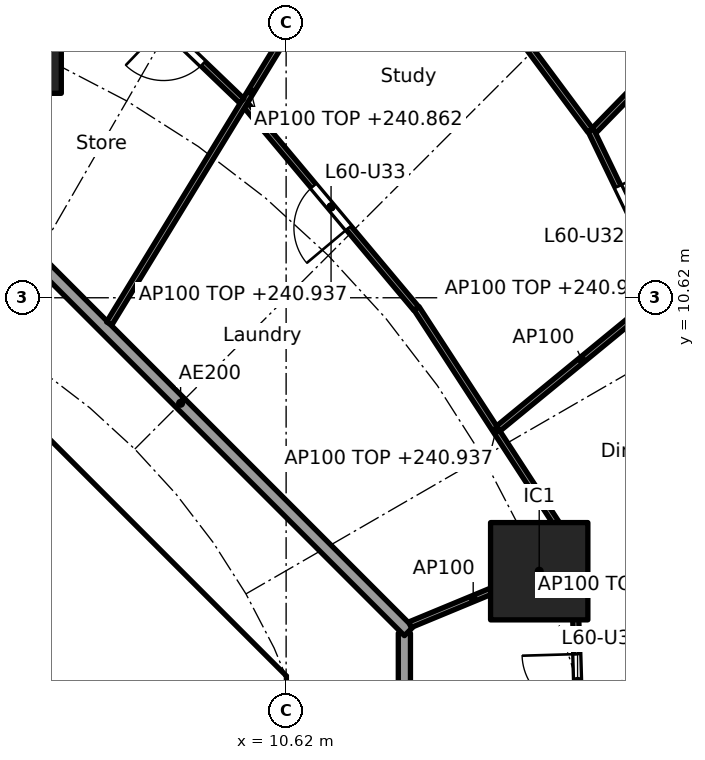
"""IFC4 building model, lengths in metres.
Left out: names, types, materials, properties, quantities, classifications, styles, units other than length and angle.
Written with IfcOpenShell. Run it as: python <this file> out.ifc"""

import sys

from ifc_helpers import new_model, si_unit, direction, frame, frame_2d, origin, origin_2d, place, context, subcontext, project, spatial, polyline, rectangle, outline, extrude, element, fill, save


model = new_model("IFC4")
c1 = context("Model", 3, precision=1e-05, world=origin(), true_north=direction((0.0, 1.0)))
c2 = subcontext(c1, "Body", "Model", "MODEL_VIEW")
j1 = project(units=[si_unit("LENGTHUNIT", "METRE"), si_unit("PLANEANGLEUNIT", "RADIAN")], contexts=[c1])
p1 = place(None, origin())
s1 = spatial("IfcSite", under=j1, at=p1, CompositionType="ELEMENT")
p2 = place(p1, origin())
s2 = spatial("IfcBuilding", under=s1, at=p2, CompositionType="ELEMENT")
p3 = place(p2, frame((0.0, 0.0, 238.1)))
s3 = spatial("IfcBuildingStorey", under=s2, at=p3, CompositionType="ELEMENT", Elevation=238.1)
for number, where, z_axis, x_axis in (
    (1, (14.782, 6.123, 0.0), (0.0, 0.0, 1.0), (1.0, 0.0, 0.0)),
    (2, (6.123, 14.782, 0.0), (0.0, 0.0, 1.0), (1.0, 0.0, 0.0)),
):
    element("IfcColumn", number, at=place(p3, frame(where, z_axis=z_axis, x_axis=x_axis)), inside=s3, PredefinedType="COLUMN", context=c2, shape_type="SweptSolid", body=[
        extrude(rectangle(XDim=1.6, YDim=1.6, at=origin_2d()), origin(), (0.0, 0.0, 1.0), 3.7),
    ])
p4 = place(p3, frame((9.988, 4.613, 0.0), z_axis=(0.0, 0.0, 1.0), x_axis=(-0.707106781187, 0.707106781187, 0.0)))
e3 = element("IfcWall", 3, at=p4, inside=s3, PredefinedType="SHEAR", context=c2, shape_type="SweptSolid", body=[
    extrude(rectangle(XDim=7.602, YDim=0.6, at=frame_2d((3.801, 0.0))), origin(), (0.0, 0.0, 1.0), 3.44),
])
p5 = place(p4, frame((3.201, 0.0, 0.0)))
e4 = element("IfcOpeningElement", 4, at=p5, cuts=e3, PredefinedType="OPENING", context=c2, shape_type="SweptSolid", body=[
    extrude(rectangle(XDim=1.2, YDim=2.1, at=frame_2d((0.6, 1.05))), frame((0.0, 0.31, 0.0), z_axis=(0.0, -1.0, 0.0), x_axis=(1.0, 0.0, 0.0)), (0.0, 0.0, 1.0), 0.62),
])
p6 = place(p3, origin())
e5 = element("IfcWall", 5, at=p6, inside=s3, PredefinedType="SHEAR", context=c2, shape_type="SweptSolid", body=[
    extrude(outline(polyline([(9.776, -4.401), (10.025, -4.152), (10.025, -3.801), (10.025, 4.152), (9.776, 4.401), (10.2, 4.825), (10.625, 4.401), (10.625, -4.401), (10.2, -4.825), (9.776, -4.401)])), origin(), (0.0, 0.0, 1.0), 3.44),
])
p7 = place(p3, frame((12.565, -5.104, 0.0), z_axis=(0.0, 0.0, 1.0), x_axis=(0.0, 1.0, 0.0)))
e6 = element("IfcWall", 6, at=p7, inside=s3, PredefinedType="PARTITIONING", context=c2, shape_type="SweptSolid", body=[
    extrude(rectangle(XDim=10.209, YDim=0.2, at=frame_2d((5.104, 0.0))), origin(), (0.0, 0.0, 1.0), 3.44),
])
p8 = place(p3, frame((12.635, 5.134, 0.0), z_axis=(0.0, 0.0, 1.0), x_axis=(-0.707106781187, 0.707106781187, 0.0)))
e7 = element("IfcWall", 7, at=p8, inside=s3, PredefinedType="PARTITIONING", context=c2, shape_type="SweptSolid", body=[
    extrude(rectangle(XDim=10.609, YDim=0.2, at=frame_2d((5.305, 0.0))), origin(), (0.0, 0.0, 1.0), 3.44),
])
p9 = place(p3, frame((15.475, 2.2, 0.0), z_axis=(0.0, 0.0, 1.0), x_axis=(-0.029254637498, 0.999571991497, 0.0)))
e8 = element("IfcWall", 8, at=p9, inside=s3, PredefinedType="PARTITIONING", context=c2, shape_type="SweptSolid", body=[
    extrude(rectangle(XDim=4.223, YDim=0.1, at=frame_2d((2.111, 0.0))), origin(), (0.0, 0.0, 1.0), 2.837),
])
p10 = place(p9, frame((1.661, 0.0, 0.0)))
e9 = element("IfcOpeningElement", 9, at=p10, cuts=e8, PredefinedType="OPENING", context=c2, shape_type="SweptSolid", body=[
    extrude(rectangle(XDim=0.9, YDim=2.1, at=frame_2d((0.45, 1.05))), frame((0.0, 0.06, 0.0), z_axis=(0.0, -1.0, 0.0), x_axis=(1.0, 0.0, 0.0)), (0.0, 0.0, 1.0), 0.12),
])
p11 = place(p3, frame((12.657, 5.243, 0.0), z_axis=(0.0, 0.0, 1.0), x_axis=(0.923864733477, 0.382719158442, 0.0)))
e10 = element("IfcWall", 10, at=p11, inside=s3, PredefinedType="PARTITIONING", context=c2, shape_type="SweptSolid", body=[
    extrude(rectangle(XDim=2.25, YDim=0.1, at=frame_2d((1.125, 0.0))), origin(), (0.0, 0.0, 1.0), 3.44),
])
p12 = place(p3, frame((15.377, 6.429, 0.0), z_axis=(0.0, 0.0, 1.0), x_axis=(-0.545188882757, 0.838313236278, 0.0)))
e11 = element("IfcWall", 11, at=p12, inside=s3, PredefinedType="PARTITIONING", context=c2, shape_type="SweptSolid", body=[
    extrude(rectangle(XDim=4.792, YDim=0.1, at=frame_2d((2.396, 0.0))), origin(), (0.0, 0.0, 1.0), 2.837),
])
p13 = place(p3, frame((18.16, 8.134, 0.0), z_axis=(0.0, 0.0, 1.0), x_axis=(-0.434644733493, 0.900601996248, 0.0)))
e12 = element("IfcWall", 12, at=p13, inside=s3, PredefinedType="PARTITIONING", context=c2, shape_type="SweptSolid", body=[
    extrude(rectangle(XDim=5.824, YDim=0.1, at=frame_2d((2.912, 0.0))), origin(), (0.0, 0.0, 1.0), 2.837),
])
p14 = place(p13, frame((3.893, 0.0, 0.0)))
e13 = element("IfcOpeningElement", 13, at=p14, cuts=e12, PredefinedType="OPENING", context=c2, shape_type="SweptSolid", body=[
    extrude(rectangle(XDim=0.9, YDim=2.1, at=frame_2d((0.45, 1.05))), frame((0.0, 0.06, 0.0), z_axis=(0.0, -1.0, 0.0), x_axis=(1.0, 0.0, 0.0)), (0.0, 0.0, 1.0), 0.12),
])
p15 = place(p13, frame((1.031, 0.0, 0.0)))
e14 = element("IfcOpeningElement", 14, at=p15, cuts=e12, PredefinedType="OPENING", context=c2, shape_type="SweptSolid", body=[
    extrude(rectangle(XDim=0.9, YDim=2.1, at=frame_2d((0.45, 1.05))), frame((0.0, 0.06, 0.0), z_axis=(0.0, -1.0, 0.0), x_axis=(1.0, 0.0, 0.0)), (0.0, 0.0, 1.0), 0.12),
])
p16 = place(p3, frame((14.109, 8.469, 0.0), z_axis=(0.0, 0.0, 1.0), x_axis=(0.772802064515, 0.634647121699, 0.0)))
e15 = element("IfcWall", 15, at=p16, inside=s3, PredefinedType="PARTITIONING", context=c2, shape_type="SweptSolid", body=[
    extrude(rectangle(XDim=3.554, YDim=0.1, at=frame_2d((1.777, 0.0))), origin(), (0.0, 0.0, 1.0), 3.44),
])
p17 = place(p3, frame((12.759, 10.443, 0.0), z_axis=(0.0, 0.0, 1.0), x_axis=(-0.642225196965, 0.766516011825, 0.0)))
e16 = element("IfcWall", 16, at=p17, inside=s3, PredefinedType="PARTITIONING", context=c2, shape_type="SweptSolid", body=[
    extrude(rectangle(XDim=4.361, YDim=0.1, at=frame_2d((2.18, 0.0))), origin(), (0.0, 0.0, 1.0), 2.837),
])
p18 = place(p17, frame((1.73, 0.0, 0.0)))
e17 = element("IfcOpeningElement", 17, at=p18, cuts=e16, PredefinedType="OPENING", context=c2, shape_type="SweptSolid", body=[
    extrude(rectangle(XDim=0.9, YDim=2.1, at=frame_2d((0.45, 1.05))), frame((0.0, 0.06, 0.0), z_axis=(0.0, -1.0, 0.0), x_axis=(1.0, 0.0, 0.0)), (0.0, 0.0, 1.0), 0.12),
])
p19 = place(p3, frame((15.685, 13.37, 0.0), z_axis=(0.0, 0.0, 1.0), x_axis=(0.698404210398, 0.715703541208, 0.0)))
e18 = element("IfcWall", 18, at=p19, inside=s3, PredefinedType="PARTITIONING", context=c2, shape_type="SweptSolid", body=[
    extrude(rectangle(XDim=3.796, YDim=0.1, at=frame_2d((1.898, 0.0))), origin(), (0.0, 0.0, 1.0), 3.44),
])
p20 = place(p3, frame((15.621, 13.374, 0.0), z_axis=(0.0, 0.0, 1.0), x_axis=(-0.596174489482, 0.8028548923, 0.0)))
e19 = element("IfcWall", 19, at=p20, inside=s3, PredefinedType="PARTITIONING", context=c2, shape_type="SweptSolid", body=[
    extrude(rectangle(XDim=5.442, YDim=0.1, at=frame_2d((2.721, 0.0))), origin(), (0.0, 0.0, 1.0), 2.837),
])
p21 = place(p3, frame((7.71, 10.197, 0.0), z_axis=(0.0, 0.0, 1.0), x_axis=(0.521477621335, 0.853264959111, 0.0)))
e20 = element("IfcWall", 20, at=p21, inside=s3, PredefinedType="PARTITIONING", context=c2, shape_type="SweptSolid", body=[
    extrude(rectangle(XDim=8.941, YDim=0.1, at=frame_2d((4.471, 0.0))), origin(), (0.0, 0.0, 1.0), 2.762),
])
p22 = place(p21, frame((6.121, 0.0, 0.0)))
e21 = element("IfcOpeningElement", 21, at=p22, cuts=e20, PredefinedType="OPENING", context=c2, shape_type="SweptSolid", body=[
    extrude(rectangle(XDim=0.9, YDim=2.1, at=frame_2d((0.45, 1.05))), frame((0.0, 0.06, 0.0), z_axis=(0.0, -1.0, 0.0), x_axis=(1.0, 0.0, 0.0)), (0.0, 0.0, 1.0), 0.12),
])
p23 = place(p3, frame((9.89, 13.858, 0.0), z_axis=(0.0, 0.0, 1.0), x_axis=(-0.72167233993, 0.692234811159, 0.0)))
e22 = element("IfcWall", 22, at=p23, inside=s3, PredefinedType="PARTITIONING", context=c2, shape_type="SweptSolid", body=[
    extrude(rectangle(XDim=4.313, YDim=0.1, at=frame_2d((2.156, 0.0))), origin(), (0.0, 0.0, 1.0), 2.837),
])
p24 = place(p23, frame((0.883, 0.0, 0.0)))
e23 = element("IfcOpeningElement", 23, at=p24, cuts=e22, PredefinedType="OPENING", context=c2, shape_type="SweptSolid", body=[
    extrude(rectangle(XDim=0.9, YDim=2.1, at=frame_2d((0.45, 1.05))), frame((0.0, 0.06, 0.0), z_axis=(0.0, -1.0, 0.0), x_axis=(1.0, 0.0, 0.0)), (0.0, 0.0, 1.0), 0.12),
])
p25 = place(p5, origin())
e24 = element("IfcDoor", 24, at=p25, inside=s3, OperationType="SINGLE_SWING_LEFT", PredefinedType="DOOR", context=c2, shape_type="SweptSolid", body=[
    extrude(rectangle(XDim=1.2, YDim=2.1, at=frame_2d((0.6, 1.05))), frame((0.0, 0.025, 0.0), z_axis=(0.0, -1.0, 0.0), x_axis=(1.0, 0.0, 0.0)), (0.0, 0.0, 1.0), 0.05),
])
fill(e4, e24)
p26 = place(p24, origin())
e25 = element("IfcDoor", 25, at=p26, inside=s3, OperationType="SINGLE_SWING_RIGHT", PredefinedType="DOOR", context=c2, shape_type="SweptSolid", body=[
    extrude(rectangle(XDim=0.9, YDim=2.1, at=frame_2d((0.45, 1.05))), frame((0.0, 0.025, 0.0), z_axis=(0.0, -1.0, 0.0), x_axis=(1.0, 0.0, 0.0)), (0.0, 0.0, 1.0), 0.05),
])
fill(e23, e25)
p27 = place(p14, frame((0.9, 0.0, 0.0), x_axis=(-1.0, 0.0, 0.0)))
e26 = element("IfcDoor", 26, at=p27, inside=s3, OperationType="SINGLE_SWING_LEFT", PredefinedType="DOOR", context=c2, shape_type="SweptSolid", body=[
    extrude(rectangle(XDim=0.9, YDim=2.1, at=frame_2d((0.45, 1.05))), frame((0.0, 0.025, 0.0), z_axis=(0.0, -1.0, 0.0), x_axis=(1.0, 0.0, 0.0)), (0.0, 0.0, 1.0), 0.05),
])
fill(e13, e26)
p28 = place(p18, origin())
e27 = element("IfcDoor", 27, at=p28, inside=s3, OperationType="SINGLE_SWING_LEFT", PredefinedType="DOOR", context=c2, shape_type="SweptSolid", body=[
    extrude(rectangle(XDim=0.9, YDim=2.1, at=frame_2d((0.45, 1.05))), frame((0.0, 0.025, 0.0), z_axis=(0.0, -1.0, 0.0), x_axis=(1.0, 0.0, 0.0)), (0.0, 0.0, 1.0), 0.05),
])
fill(e17, e27)
p29 = place(p10, origin())
e28 = element("IfcDoor", 28, at=p29, inside=s3, OperationType="SINGLE_SWING_RIGHT", PredefinedType="DOOR", context=c2, shape_type="SweptSolid", body=[
    extrude(rectangle(XDim=0.9, YDim=2.1, at=frame_2d((0.45, 1.05))), frame((0.0, 0.025, 0.0), z_axis=(0.0, -1.0, 0.0), x_axis=(1.0, 0.0, 0.0)), (0.0, 0.0, 1.0), 0.05),
])
fill(e9, e28)
save(model, sys.argv[1])
